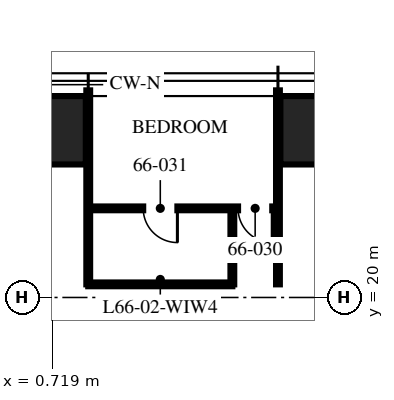
"""IFC4 building model, lengths in metres.
Left out: names, types, materials, properties, quantities, classifications, styles, units other than length and angle.
Written with IfcOpenShell. Run it as: python <this file> out.ifc"""

import sys

from ifc_helpers import new_model, si_unit, direction, frame, frame_2d, origin, origin_2d, place, context, subcontext, project, spatial, rectangle, hollow_rectangle, extrude, element, fill, save


model = new_model("IFC4")
c1 = context("Model", 3, precision=1e-05, world=origin(), true_north=direction((0.0, 1.0)))
c2 = subcontext(c1, "Body", "Model", "MODEL_VIEW")
j1 = project(units=[si_unit("LENGTHUNIT", "METRE"), si_unit("PLANEANGLEUNIT", "RADIAN")], contexts=[c1])
p1 = place(None, origin())
s1 = spatial("IfcSite", under=j1, at=p1, CompositionType="ELEMENT")
p2 = place(p1, origin())
s2 = spatial("IfcBuilding", under=s1, at=p2, CompositionType="ELEMENT")
p3 = place(p2, frame((0.0, 0.0, 263.25)))
s3 = spatial("IfcBuildingStorey", under=s2, at=p3, CompositionType="ELEMENT", Elevation=263.25)
for number, where, z_axis, x_axis in (
    (1, (0.0, 24.4, 0.0), (0.0, 0.0, 1.0), (1.0, 0.0, 0.0)),
    (2, (8.32, 24.4, 0.0), (0.0, 0.0, 1.0), (1.0, 0.0, 0.0)),
):
    element("IfcColumn", number, at=place(p3, frame(where, z_axis=z_axis, x_axis=x_axis)), inside=s3, PredefinedType="COLUMN", context=c2, shape_type="SweptSolid", body=[
        extrude(hollow_rectangle(XDim=3.2, YDim=1.8, WallThickness=0.14, at=origin_2d()), origin(), (0.0, 0.0, 1.0), 3.75),
    ])
for number, where, z_axis, x_axis in (
    (3, (6.656, 20.345, 0.0), (0.0, 0.0, 1.0), (0.0, 1.0, 0.0)),
    (4, (1.664, 20.345, 0.0), (0.0, 0.0, 1.0), (0.0, 1.0, 0.0)),
):
    element("IfcWall", number, at=place(p3, frame(where, z_axis=z_axis, x_axis=x_axis)), inside=s3, PredefinedType="PARTITIONING", context=c2, shape_type="SweptSolid", body=[
        extrude(rectangle(XDim=5.105, YDim=0.1, at=frame_2d((2.552, 0.0))), origin(), (0.0, 0.0, 1.0), 2.91),
    ])
p4 = place(p3, frame((6.656, 22.345, 0.0), z_axis=(0.0, 0.0, 1.0), x_axis=(-1.0, 0.0, 0.0)))
e5 = element("IfcWall", 5, at=p4, inside=s3, PredefinedType="PARTITIONING", context=c2, shape_type="SweptSolid", body=[
    extrude(rectangle(XDim=4.992, YDim=0.1, at=frame_2d((2.496, 0.0))), origin(), (0.0, 0.0, 1.0), 2.81),
])
p5 = place(p4, frame((0.15, 0.0, 0.0)))
e6 = element("IfcOpeningElement", 6, at=p5, cuts=e5, PredefinedType="OPENING", context=c2, shape_type="SweptSolid", body=[
    extrude(rectangle(XDim=0.9, YDim=2.1, at=frame_2d((0.45, 1.05))), frame((0.0, 0.06, 0.0), z_axis=(0.0, -1.0, 0.0), x_axis=(1.0, 0.0, 0.0)), (0.0, 0.0, 1.0), 0.12),
])
p6 = place(p4, frame((2.646, 0.0, 0.0)))
e7 = element("IfcOpeningElement", 7, at=p6, cuts=e5, PredefinedType="OPENING", context=c2, shape_type="SweptSolid", body=[
    extrude(rectangle(XDim=0.9, YDim=2.1, at=frame_2d((0.45, 1.05))), frame((0.0, 0.06, 0.0), z_axis=(0.0, -1.0, 0.0), x_axis=(1.0, 0.0, 0.0)), (0.0, 0.0, 1.0), 0.12),
])
p7 = place(p3, frame((5.456, 20.345, 0.0), z_axis=(0.0, 0.0, 1.0), x_axis=(0.0, 1.0, 0.0)))
e8 = element("IfcWall", 8, at=p7, inside=s3, PredefinedType="PARTITIONING", context=c2, shape_type="SweptSolid", body=[
    extrude(rectangle(XDim=2.0, YDim=0.1, at=frame_2d((1.0, 0.0))), origin(), (0.0, 0.0, 1.0), 3.5),
])
p8 = place(p3, frame((5.456, 20.345, 0.0), z_axis=(0.0, 0.0, 1.0), x_axis=(-1.0, 0.0, 0.0)))
e9 = element("IfcWall", 9, at=p8, inside=s3, PredefinedType="PARTITIONING", context=c2, shape_type="SweptSolid", body=[
    extrude(rectangle(XDim=3.792, YDim=0.1, at=frame_2d((1.896, 0.0))), origin(), (0.0, 0.0, 1.0), 2.81),
])
p9 = place(p5, origin())
e10 = element("IfcDoor", 10, at=p9, inside=s3, OperationType="SINGLE_SWING_LEFT", PredefinedType="DOOR", context=c2, shape_type="SweptSolid", body=[
    extrude(rectangle(XDim=0.9, YDim=2.1, at=frame_2d((0.45, 1.05))), frame((0.0, 0.025, 0.0), z_axis=(0.0, -1.0, 0.0), x_axis=(1.0, 0.0, 0.0)), (0.0, 0.0, 1.0), 0.05),
])
fill(e6, e10)
p10 = place(p6, origin())
e11 = element("IfcDoor", 11, at=p10, inside=s3, OperationType="SINGLE_SWING_LEFT", PredefinedType="DOOR", context=c2, shape_type="SweptSolid", body=[
    extrude(rectangle(XDim=0.9, YDim=2.1, at=frame_2d((0.45, 1.05))), frame((0.0, 0.025, 0.0), z_axis=(0.0, -1.0, 0.0), x_axis=(1.0, 0.0, 0.0)), (0.0, 0.0, 1.0), 0.05),
])
fill(e7, e11)
save(model, sys.argv[1])
